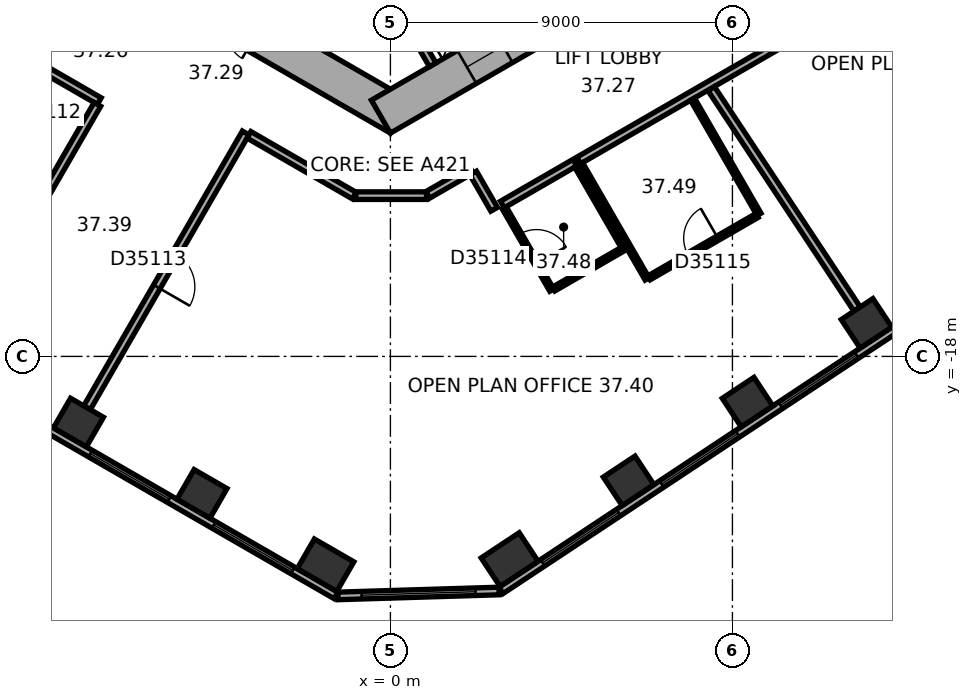
"""IFC4 building model, lengths in metres.
Left out: names, types, materials, properties, quantities, classifications, styles, units other than length and angle.
Written with IfcOpenShell. Run it as: python <this file> out.ifc"""

import sys

from ifc_helpers import new_model, si_unit, direction, frame, frame_2d, origin, origin_2d, place, context, subcontext, project, spatial, rectangle, extrude, element, fill, save


model = new_model("IFC4")
c1 = context("Model", 3, precision=1e-05, world=origin(), true_north=direction((0.0, 1.0)))
c2 = subcontext(c1, "Body", "Model", "MODEL_VIEW")
j1 = project(units=[si_unit("LENGTHUNIT", "METRE"), si_unit("PLANEANGLEUNIT", "RADIAN")], contexts=[c1])
p1 = place(None, origin())
s1 = spatial("IfcSite", under=j1, at=p1, CompositionType="ELEMENT")
p2 = place(p1, origin())
s2 = spatial("IfcBuilding", under=s1, at=p2, CompositionType="ELEMENT")
p3 = place(p2, frame((0.0, 0.0, 154.0)))
s3 = spatial("IfcBuildingStorey", under=s2, at=p3, CompositionType="ELEMENT", Elevation=154.0)
for number, where, z_axis, x_axis in (
    (1, (-8.208, -19.74, 0.0), (0.0, 0.0, 1.0), (0.866, -0.5, 0.0)),
    (2, (-4.958, -21.617, 0.0), (0.0, 0.0, 1.0), (0.866, -0.5, 0.0)),
):
    element("IfcColumn", number, at=place(p3, frame(where, z_axis=z_axis, x_axis=x_axis)), inside=s3, PredefinedType="COLUMN", context=c2, shape_type="SweptSolid", body=[
        extrude(rectangle(XDim=1.0, YDim=0.9, at=origin_2d()), origin(), (0.0, 0.0, 1.0), 3.7),
    ])
for number, where, z_axis, x_axis in (
    (3, (-1.706, -23.494, 0.0), (0.0, 0.0, 1.0), (0.866, -0.5, 0.0)),
    (4, (3.137, -23.346, 0.0), (0.0, 0.0, 1.0), (0.834, 0.552, 0.0)),
):
    element("IfcColumn", number, at=place(p3, frame(where, z_axis=z_axis, x_axis=x_axis)), inside=s3, PredefinedType="COLUMN", context=c2, shape_type="SweptSolid", body=[
        extrude(rectangle(XDim=1.2, YDim=0.9, at=origin_2d()), origin(), (0.0, 0.0, 1.0), 3.7),
    ])
for number, where, z_axis, x_axis in (
    (5, (6.268, -21.274, 0.0), (0.0, 0.0, 1.0), (0.834, 0.552, 0.0)),
    (6, (9.398, -19.202, 0.0), (0.0, 0.0, 1.0), (0.834, 0.552, 0.0)),
    (7, (12.529, -17.13, 0.0), (0.0, 0.0, 1.0), (0.834, 0.552, 0.0)),
):
    element("IfcColumn", number, at=place(p3, frame(where, z_axis=z_axis, x_axis=x_axis)), inside=s3, PredefinedType="COLUMN", context=c2, shape_type="SweptSolid", body=[
        extrude(rectangle(XDim=1.0, YDim=0.9, at=origin_2d()), origin(), (0.0, 0.0, 1.0), 3.7),
    ])
p4 = place(p3, frame((-10.25, -5.629, 0.0), z_axis=(0.0, 0.0, 1.0), x_axis=(0.866022616891, -0.50000482701, 0.0)))
e8 = element("IfcWall", 8, at=p4, inside=s3, PredefinedType="SHEAR", context=c2, shape_type="SweptSolid", body=[
    extrude(rectangle(XDim=12.125, YDim=1.0, at=frame_2d((6.062, 0.0))), origin(), (0.0, 0.0, 1.0), 3.7),
])
p5 = place(p4, frame((6.262, 0.0, 0.0)))
e9 = element("IfcOpeningElement", 9, at=p5, cuts=e8, PredefinedType="OPENING", context=c2, shape_type="SweptSolid", body=[
    extrude(rectangle(XDim=1.5, YDim=2.1, at=frame_2d((0.75, 1.05))), frame((0.0, 0.51, 0.0), z_axis=(0.0, -1.0, 0.0), x_axis=(1.0, 0.0, 0.0)), (0.0, 0.0, 1.0), 1.02),
])
p6 = place(p4, frame((1.712, 0.0, 0.0)))
e10 = element("IfcOpeningElement", 10, at=p6, cuts=e8, PredefinedType="OPENING", context=c2, shape_type="SweptSolid", body=[
    extrude(rectangle(XDim=1.1, YDim=2.1, at=frame_2d((0.55, 1.05))), frame((0.0, 0.51, 0.0), z_axis=(0.0, -1.0, 0.0), x_axis=(1.0, 0.0, 0.0)), (0.0, 0.0, 1.0), 1.02),
])
p7 = place(p4, frame((4.312, 0.0, 0.0)))
e11 = element("IfcOpeningElement", 11, at=p7, cuts=e8, PredefinedType="OPENING", context=c2, shape_type="SweptSolid", body=[
    extrude(rectangle(XDim=1.1, YDim=2.1, at=frame_2d((0.55, 1.05))), frame((0.0, 0.51, 0.0), z_axis=(0.0, -1.0, 0.0), x_axis=(1.0, 0.0, 0.0)), (0.0, 0.0, 1.0), 1.02),
])
p8 = place(p3, frame((-0.25, -11.691, 0.0), z_axis=(0.0, 0.0, 1.0), x_axis=(0.866022616891, 0.50000482701, 0.0)))
e12 = element("IfcWall", 12, at=p8, inside=s3, PredefinedType="SHEAR", context=c2, shape_type="SweptSolid", body=[
    extrude(rectangle(XDim=12.125, YDim=1.0, at=frame_2d((6.062, 0.0))), origin(), (0.0, 0.0, 1.0), 3.7),
])
p9 = place(p8, frame((2.612, 0.0, 0.0)))
e13 = element("IfcOpeningElement", 13, at=p9, cuts=e12, PredefinedType="OPENING", context=c2, shape_type="SweptSolid", body=[
    extrude(rectangle(XDim=1.1, YDim=2.1, at=frame_2d((0.55, 1.05))), frame((0.0, 0.51, 0.0), z_axis=(0.0, -1.0, 0.0), x_axis=(1.0, 0.0, 0.0)), (0.0, 0.0, 1.0), 1.02),
])
p10 = place(p8, frame((5.212, 0.0, 0.0)))
e14 = element("IfcOpeningElement", 14, at=p10, cuts=e12, PredefinedType="OPENING", context=c2, shape_type="SweptSolid", body=[
    extrude(rectangle(XDim=1.1, YDim=2.1, at=frame_2d((0.55, 1.05))), frame((0.0, 0.51, 0.0), z_axis=(0.0, -1.0, 0.0), x_axis=(1.0, 0.0, 0.0)), (0.0, 0.0, 1.0), 1.02),
])
p11 = place(p8, frame((7.812, 0.0, 0.0)))
e15 = element("IfcOpeningElement", 15, at=p11, cuts=e12, PredefinedType="OPENING", context=c2, shape_type="SweptSolid", body=[
    extrude(rectangle(XDim=1.1, YDim=2.1, at=frame_2d((0.55, 1.05))), frame((0.0, 0.51, 0.0), z_axis=(0.0, -1.0, 0.0), x_axis=(1.0, 0.0, 0.0)), (0.0, 0.0, 1.0), 1.02),
])
p12 = place(p3, frame((-18.789, -14.267, 0.0), z_axis=(0.0, 0.0, 1.0), x_axis=(0.866023315909, -0.500003616288, 0.0)))
e16 = element("IfcWall", 16, at=p12, inside=s3, PredefinedType="STANDARD", context=c2, shape_type="SweptSolid", body=[
    extrude(rectangle(XDim=20.044, YDim=0.2, at=frame_2d((10.022, 0.0))), origin(), (0.0, 0.0, 1.0), 3.7),
])
p13 = place(p12, frame((1.314, 0.0, 0.9)))
e17 = element("IfcOpeningElement", 17, at=p13, cuts=e16, PredefinedType="OPENING", context=c2, shape_type="SweptSolid", body=[
    extrude(rectangle(XDim=2.4, YDim=2.0, at=frame_2d((1.2, 1.0))), frame((0.0, 0.11, 0.0), z_axis=(0.0, -1.0, 0.0), x_axis=(1.0, 0.0, 0.0)), (0.0, 0.0, 1.0), 0.22),
])
p14 = place(p12, frame((5.069, 0.0, 0.9)))
e18 = element("IfcOpeningElement", 18, at=p14, cuts=e16, PredefinedType="OPENING", context=c2, shape_type="SweptSolid", body=[
    extrude(rectangle(XDim=2.4, YDim=2.0, at=frame_2d((1.2, 1.0))), frame((0.0, 0.11, 0.0), z_axis=(0.0, -1.0, 0.0), x_axis=(1.0, 0.0, 0.0)), (0.0, 0.0, 1.0), 0.22),
])
p15 = place(p12, frame((8.823, 0.0, 0.9)))
e19 = element("IfcOpeningElement", 19, at=p15, cuts=e16, PredefinedType="OPENING", context=c2, shape_type="SweptSolid", body=[
    extrude(rectangle(XDim=2.4, YDim=2.0, at=frame_2d((1.2, 1.0))), frame((0.0, 0.11, 0.0), z_axis=(0.0, -1.0, 0.0), x_axis=(1.0, 0.0, 0.0)), (0.0, 0.0, 1.0), 0.22),
])
p16 = place(p12, frame((12.577, 0.0, 0.9)))
e20 = element("IfcOpeningElement", 20, at=p16, cuts=e16, PredefinedType="OPENING", context=c2, shape_type="SweptSolid", body=[
    extrude(rectangle(XDim=2.4, YDim=2.0, at=frame_2d((1.2, 1.0))), frame((0.0, 0.11, 0.0), z_axis=(0.0, -1.0, 0.0), x_axis=(1.0, 0.0, 0.0)), (0.0, 0.0, 1.0), 0.22),
])
p17 = place(p12, frame((16.331, 0.0, 0.9)))
e21 = element("IfcOpeningElement", 21, at=p17, cuts=e16, PredefinedType="OPENING", context=c2, shape_type="SweptSolid", body=[
    extrude(rectangle(XDim=2.4, YDim=2.0, at=frame_2d((1.2, 1.0))), frame((0.0, 0.11, 0.0), z_axis=(0.0, -1.0, 0.0), x_axis=(1.0, 0.0, 0.0)), (0.0, 0.0, 1.0), 0.22),
])
p18 = place(p3, frame((-1.378, -24.302, 0.0), z_axis=(0.0, 0.0, 1.0), x_axis=(0.999533857267, 0.030529791629, 0.0)))
e22 = element("IfcWall", 22, at=p18, inside=s3, PredefinedType="STANDARD", context=c2, shape_type="SweptSolid", body=[
    extrude(rectangle(XDim=4.238, YDim=0.2, at=frame_2d((2.119, 0.0))), origin(), (0.0, 0.0, 1.0), 3.7),
])
p19 = place(p18, frame((0.619, 0.0, 0.9)))
e23 = element("IfcOpeningElement", 23, at=p19, cuts=e22, PredefinedType="OPENING", context=c2, shape_type="SweptSolid", body=[
    extrude(rectangle(XDim=3.0, YDim=2.0, at=frame_2d((1.5, 1.0))), frame((0.0, 0.11, 0.0), z_axis=(0.0, -1.0, 0.0), x_axis=(1.0, 0.0, 0.0)), (0.0, 0.0, 1.0), 0.22),
])
p20 = place(p3, frame((2.911, -24.156, 0.0), z_axis=(0.0, 0.0, 1.0), x_axis=(0.833882163564, 0.551942512668, 0.0)))
e24 = element("IfcWall", 24, at=p20, inside=s3, PredefinedType="STANDARD", context=c2, shape_type="SweptSolid", body=[
    extrude(rectangle(XDim=20.044, YDim=0.2, at=frame_2d((10.022, 0.0))), origin(), (0.0, 0.0, 1.0), 3.7),
])
p21 = place(p20, frame((1.313, 0.0, 0.9)))
e25 = element("IfcOpeningElement", 25, at=p21, cuts=e24, PredefinedType="OPENING", context=c2, shape_type="SweptSolid", body=[
    extrude(rectangle(XDim=2.4, YDim=2.0, at=frame_2d((1.2, 1.0))), frame((0.0, 0.11, 0.0), z_axis=(0.0, -1.0, 0.0), x_axis=(1.0, 0.0, 0.0)), (0.0, 0.0, 1.0), 0.22),
])
p22 = place(p20, frame((5.067, 0.0, 0.9)))
e26 = element("IfcOpeningElement", 26, at=p22, cuts=e24, PredefinedType="OPENING", context=c2, shape_type="SweptSolid", body=[
    extrude(rectangle(XDim=2.4, YDim=2.0, at=frame_2d((1.2, 1.0))), frame((0.0, 0.11, 0.0), z_axis=(0.0, -1.0, 0.0), x_axis=(1.0, 0.0, 0.0)), (0.0, 0.0, 1.0), 0.22),
])
p23 = place(p20, frame((8.821, 0.0, 0.9)))
e27 = element("IfcOpeningElement", 27, at=p23, cuts=e24, PredefinedType="OPENING", context=c2, shape_type="SweptSolid", body=[
    extrude(rectangle(XDim=2.4, YDim=2.0, at=frame_2d((1.2, 1.0))), frame((0.0, 0.11, 0.0), z_axis=(0.0, -1.0, 0.0), x_axis=(1.0, 0.0, 0.0)), (0.0, 0.0, 1.0), 0.22),
])
p24 = place(p20, frame((12.575, 0.0, 0.9)))
e28 = element("IfcOpeningElement", 28, at=p24, cuts=e24, PredefinedType="OPENING", context=c2, shape_type="SweptSolid", body=[
    extrude(rectangle(XDim=2.4, YDim=2.0, at=frame_2d((1.2, 1.0))), frame((0.0, 0.11, 0.0), z_axis=(0.0, -1.0, 0.0), x_axis=(1.0, 0.0, 0.0)), (0.0, 0.0, 1.0), 0.22),
])
p25 = place(p20, frame((16.329, 0.0, 0.9)))
e29 = element("IfcOpeningElement", 29, at=p25, cuts=e24, PredefinedType="OPENING", context=c2, shape_type="SweptSolid", body=[
    extrude(rectangle(XDim=2.4, YDim=2.0, at=frame_2d((1.2, 1.0))), frame((0.0, 0.11, 0.0), z_axis=(0.0, -1.0, 0.0), x_axis=(1.0, 0.0, 0.0)), (0.0, 0.0, 1.0), 0.22),
])
p26 = place(p3, frame((0.013, -8.422, 0.0), z_axis=(0.0, 0.0, 1.0), x_axis=(0.500077893725, -0.86598042715, 0.0)))
e30 = element("IfcWall", 30, at=p26, inside=s3, PredefinedType="PARTITIONING", context=c2, shape_type="SweptSolid", body=[
    extrude(rectangle(XDim=2.2, YDim=0.2, at=frame_2d((1.1, 0.0))), origin(), (0.0, 0.0, 1.0), 3.42),
])
p27 = place(p3, frame((-11.435, -9.103, 0.0), z_axis=(0.0, 0.0, 1.0), x_axis=(0.866007399799, -0.500031182522, 0.0)))
e31 = element("IfcWall", 31, at=p27, inside=s3, PredefinedType="PARTITIONING", context=c2, shape_type="SweptSolid", body=[
    extrude(rectangle(XDim=4.358, YDim=0.2, at=frame_2d((2.179, 0.0))), origin(), (0.0, 0.0, 1.0), 3.42),
])
p28 = place(p3, frame((-11.235, -17.474, 0.0), z_axis=(0.0, 0.0, 1.0), x_axis=(0.500009260695, 0.866020057054, 0.0)))
e32 = element("IfcWall", 32, at=p28, inside=s3, PredefinedType="PARTITIONING", context=c2, shape_type="SweptSolid", body=[
    extrude(rectangle(XDim=7.049, YDim=0.2, at=frame_2d((3.524, 0.0))), origin(), (0.0, 0.0, 1.0), 2.87),
])
p29 = place(p28, frame((3.024, 0.0, 0.0)))
e33 = element("IfcOpeningElement", 33, at=p29, cuts=e32, PredefinedType="OPENING", context=c2, shape_type="SweptSolid", body=[
    extrude(rectangle(XDim=1.0, YDim=2.1, at=frame_2d((0.5, 1.05))), frame((0.0, 0.11, 0.0), z_axis=(0.0, -1.0, 0.0), x_axis=(1.0, 0.0, 0.0)), (0.0, 0.0, 1.0), 0.22),
])
p30 = place(p3, frame((-7.984, -19.351, 0.0), z_axis=(0.0, 0.0, 1.0), x_axis=(0.500010139422, 0.866019549707, 0.0)))
e34 = element("IfcWall", 34, at=p30, inside=s3, PredefinedType="PARTITIONING", context=c2, shape_type="SweptSolid", body=[
    extrude(rectangle(XDim=8.35, YDim=0.2, at=frame_2d((4.175, 0.0))), origin(), (0.0, 0.0, 1.0), 3.42),
])
p31 = place(p30, frame((3.675, 0.0, 0.0)))
e35 = element("IfcOpeningElement", 35, at=p31, cuts=e34, PredefinedType="OPENING", context=c2, shape_type="SweptSolid", body=[
    extrude(rectangle(XDim=1.0, YDim=2.1, at=frame_2d((0.5, 1.05))), frame((0.0, 0.11, 0.0), z_axis=(0.0, -1.0, 0.0), x_axis=(1.0, 0.0, 0.0)), (0.0, 0.0, 1.0), 0.22),
])
p32 = place(p3, frame((-3.722, -12.169, 0.0), z_axis=(0.0, 0.0, 1.0), x_axis=(0.866033163891, -0.499986558861, 0.0)))
e36 = element("IfcWall", 36, at=p32, inside=s3, PredefinedType="PARTITIONING", context=c2, shape_type="SweptSolid", body=[
    extrude(rectangle(XDim=3.201, YDim=0.2, at=frame_2d((1.6, 0.0))), origin(), (0.0, 0.0, 1.0), 3.42),
])
p33 = place(p3, frame((-0.91, -13.77, 0.0), z_axis=(0.0, 0.0, 1.0), x_axis=(1.0, 0.0, 0.0)))
e37 = element("IfcWall", 37, at=p33, inside=s3, PredefinedType="PARTITIONING", context=c2, shape_type="SweptSolid", body=[
    extrude(rectangle(XDim=1.86, YDim=0.2, at=frame_2d((0.93, 0.0))), origin(), (0.0, 0.0, 1.0), 3.42),
])
p34 = place(p3, frame((0.985, -13.75, 0.0), z_axis=(0.0, 0.0, 1.0), x_axis=(0.866028661061, 0.499994358189, 0.0)))
e38 = element("IfcWall", 38, at=p34, inside=s3, PredefinedType="PARTITIONING", context=c2, shape_type="SweptSolid", body=[
    extrude(rectangle(XDim=1.321, YDim=0.2, at=frame_2d((0.661, 0.0))), origin(), (0.0, 0.0, 1.0), 3.42),
])
p35 = place(p3, frame((2.179, -13.176, 0.0), z_axis=(0.0, 0.0, 1.0), x_axis=(0.499978356969, -0.866037899034, 0.0)))
e39 = element("IfcWall", 39, at=p35, inside=s3, PredefinedType="PARTITIONING", context=c2, shape_type="SweptSolid", body=[
    extrude(rectangle(XDim=1.101, YDim=0.2, at=frame_2d((0.551, 0.0))), origin(), (0.0, 0.0, 1.0), 3.42),
])
p36 = place(p3, frame((2.946, -14.004, 0.0), z_axis=(0.0, 0.0, 1.0), x_axis=(0.866008176907, 0.50002983664, 0.0)))
e40 = element("IfcWall", 40, at=p36, inside=s3, PredefinedType="PARTITIONING", context=c2, shape_type="SweptSolid", body=[
    extrude(rectangle(XDim=2.2, YDim=0.2, at=frame_2d((1.1, 0.0))), origin(), (0.0, 0.0, 1.0), 3.42),
])
p37 = place(p3, frame((4.246, -16.256, 0.0), z_axis=(0.0, 0.0, 1.0), x_axis=(-0.499961950354, 0.866047370643, 0.0)))
e41 = element("IfcWall", 41, at=p37, inside=s3, PredefinedType="PARTITIONING", context=c2, shape_type="SweptSolid", body=[
    extrude(rectangle(XDim=2.5, YDim=0.12, at=frame_2d((1.25, 0.0))), origin(), (0.0, 0.0, 1.0), 3.42),
])
p38 = place(p37, frame((0.8, 0.0, 0.0)))
e42 = element("IfcOpeningElement", 42, at=p38, cuts=e41, PredefinedType="OPENING", context=c2, shape_type="SweptSolid", body=[
    extrude(rectangle(XDim=0.9, YDim=2.1, at=frame_2d((0.45, 1.05))), frame((0.0, 0.07, 0.0), z_axis=(0.0, -1.0, 0.0), x_axis=(1.0, 0.0, 0.0)), (0.0, 0.0, 1.0), 0.14),
])
p39 = place(p3, frame((4.901, -12.991, 0.0), z_axis=(0.0, 0.0, 1.0), x_axis=(0.500004234368, -0.866022959057, 0.0)))
e43 = element("IfcWall", 43, at=p39, inside=s3, PredefinedType="PARTITIONING", context=c2, shape_type="SweptSolid", body=[
    extrude(rectangle(XDim=2.5, YDim=0.12, at=frame_2d((1.25, 0.0))), origin(), (0.0, 0.0, 1.0), 3.42),
])
p40 = place(p3, frame((4.955, -12.844, 0.0), z_axis=(0.0, 0.0, 1.0), x_axis=(0.86602379309, 0.500002789795, 0.0)))
e44 = element("IfcWall", 44, at=p40, inside=s3, PredefinedType="PARTITIONING", context=c2, shape_type="SweptSolid", body=[
    extrude(rectangle(XDim=6.232, YDim=0.2, at=frame_2d((3.116, 0.0))), origin(), (0.0, 0.0, 1.0), 3.42),
])
p41 = place(p3, frame((6.099, -15.186, 0.0), z_axis=(0.0, 0.0, 1.0), x_axis=(-0.866009661879, -0.500027264788, 0.0)))
e45 = element("IfcWall", 45, at=p41, inside=s3, PredefinedType="PARTITIONING", context=c2, shape_type="SweptSolid", body=[
    extrude(rectangle(XDim=2.08, YDim=0.12, at=frame_2d((1.04, 0.0))), origin(), (0.0, 0.0, 1.0), 3.42),
])
for number, where, z_axis, x_axis in (
    (46, (6.755, -15.962, 0.0), (0.0, 0.0, 1.0), (-0.5, 0.866, 0.0)),
    (47, (7.949, -11.231, 0.0), (0.0, 0.0, 1.0), (0.5, -0.866, 0.0)),
):
    element("IfcWall", number, at=place(p3, frame(where, z_axis=z_axis, x_axis=x_axis)), inside=s3, PredefinedType="PARTITIONING", context=c2, shape_type="SweptSolid", body=[
        extrude(rectangle(XDim=3.5, YDim=0.12, at=frame_2d((1.75, 0.0))), origin(), (0.0, 0.0, 1.0), 3.42),
    ])
p42 = place(p3, frame((9.647, -14.292, 0.0), z_axis=(0.0, 0.0, 1.0), x_axis=(-0.866040564224, -0.499973740429, 0.0)))
e48 = element("IfcWall", 48, at=p42, inside=s3, PredefinedType="PARTITIONING", context=c2, shape_type="SweptSolid", body=[
    extrude(rectangle(XDim=3.28, YDim=0.12, at=frame_2d((1.64, 0.0))), origin(), (0.0, 0.0, 1.0), 3.42),
])
p43 = place(p42, frame((1.19, 0.0, 0.0)))
e49 = element("IfcOpeningElement", 49, at=p43, cuts=e48, PredefinedType="OPENING", context=c2, shape_type="SweptSolid", body=[
    extrude(rectangle(XDim=0.9, YDim=2.1, at=frame_2d((0.45, 1.05))), frame((0.0, 0.07, 0.0), z_axis=(0.0, -1.0, 0.0), x_axis=(1.0, 0.0, 0.0)), (0.0, 0.0, 1.0), 0.14),
])
p44 = place(p3, frame((12.281, -16.755, 0.0), z_axis=(0.0, 0.0, 1.0), x_axis=(-0.551925794663, 0.833893228888, 0.0)))
e50 = element("IfcWall", 50, at=p44, inside=s3, PredefinedType="PARTITIONING", context=c2, shape_type="SweptSolid", body=[
    extrude(rectangle(XDim=6.953, YDim=0.2, at=frame_2d((3.476, 0.0))), origin(), (0.0, 0.0, 1.0), 3.42),
])
p45 = place(p16, origin())
e51 = element("IfcWindow", 51, at=p45, inside=s3, PartitioningType="SINGLE_PANEL", PredefinedType="WINDOW", context=c2, shape_type="SweptSolid", body=[
    extrude(rectangle(XDim=2.4, YDim=2.0, at=frame_2d((1.2, 1.0))), frame((0.0, 0.03, 0.0), z_axis=(0.0, -1.0, 0.0), x_axis=(1.0, 0.0, 0.0)), (0.0, 0.0, 1.0), 0.06),
])
fill(e20, e51)
p46 = place(p17, origin())
e52 = element("IfcWindow", 52, at=p46, inside=s3, PartitioningType="SINGLE_PANEL", PredefinedType="WINDOW", context=c2, shape_type="SweptSolid", body=[
    extrude(rectangle(XDim=2.4, YDim=2.0, at=frame_2d((1.2, 1.0))), frame((0.0, 0.03, 0.0), z_axis=(0.0, -1.0, 0.0), x_axis=(1.0, 0.0, 0.0)), (0.0, 0.0, 1.0), 0.06),
])
fill(e21, e52)
p47 = place(p19, origin())
e53 = element("IfcWindow", 53, at=p47, inside=s3, PartitioningType="SINGLE_PANEL", PredefinedType="WINDOW", context=c2, shape_type="SweptSolid", body=[
    extrude(rectangle(XDim=3.0, YDim=2.0, at=frame_2d((1.5, 1.0))), frame((0.0, 0.03, 0.0), z_axis=(0.0, -1.0, 0.0), x_axis=(1.0, 0.0, 0.0)), (0.0, 0.0, 1.0), 0.06),
])
fill(e23, e53)
p48 = place(p21, origin())
e54 = element("IfcWindow", 54, at=p48, inside=s3, PartitioningType="SINGLE_PANEL", PredefinedType="WINDOW", context=c2, shape_type="SweptSolid", body=[
    extrude(rectangle(XDim=2.4, YDim=2.0, at=frame_2d((1.2, 1.0))), frame((0.0, 0.03, 0.0), z_axis=(0.0, -1.0, 0.0), x_axis=(1.0, 0.0, 0.0)), (0.0, 0.0, 1.0), 0.06),
])
fill(e25, e54)
p49 = place(p22, origin())
e55 = element("IfcWindow", 55, at=p49, inside=s3, PartitioningType="SINGLE_PANEL", PredefinedType="WINDOW", context=c2, shape_type="SweptSolid", body=[
    extrude(rectangle(XDim=2.4, YDim=2.0, at=frame_2d((1.2, 1.0))), frame((0.0, 0.03, 0.0), z_axis=(0.0, -1.0, 0.0), x_axis=(1.0, 0.0, 0.0)), (0.0, 0.0, 1.0), 0.06),
])
fill(e26, e55)
p50 = place(p23, origin())
e56 = element("IfcWindow", 56, at=p50, inside=s3, PartitioningType="SINGLE_PANEL", PredefinedType="WINDOW", context=c2, shape_type="SweptSolid", body=[
    extrude(rectangle(XDim=2.4, YDim=2.0, at=frame_2d((1.2, 1.0))), frame((0.0, 0.03, 0.0), z_axis=(0.0, -1.0, 0.0), x_axis=(1.0, 0.0, 0.0)), (0.0, 0.0, 1.0), 0.06),
])
fill(e27, e56)
p51 = place(p9, origin())
e57 = element("IfcDoor", 57, at=p51, inside=s3, OperationType="DOUBLE_DOOR_SLIDING", PredefinedType="DOOR", context=c2, shape_type="SweptSolid", body=[
    extrude(rectangle(XDim=1.1, YDim=2.1, at=frame_2d((0.55, 1.05))), frame((0.0, 0.025, 0.0), z_axis=(0.0, -1.0, 0.0), x_axis=(1.0, 0.0, 0.0)), (0.0, 0.0, 1.0), 0.05),
])
fill(e13, e57)
p52 = place(p31, origin())
e58 = element("IfcDoor", 58, at=p52, inside=s3, OperationType="SINGLE_SWING_LEFT", PredefinedType="DOOR", context=c2, shape_type="SweptSolid", body=[
    extrude(rectangle(XDim=1.0, YDim=2.1, at=frame_2d((0.5, 1.05))), frame((0.0, 0.025, 0.0), z_axis=(0.0, -1.0, 0.0), x_axis=(1.0, 0.0, 0.0)), (0.0, 0.0, 1.0), 0.05),
])
fill(e35, e58)
p53 = place(p38, origin())
e59 = element("IfcDoor", 59, at=p53, inside=s3, OperationType="SINGLE_SWING_LEFT", PredefinedType="DOOR", context=c2, shape_type="SweptSolid", body=[
    extrude(rectangle(XDim=0.9, YDim=2.1, at=frame_2d((0.45, 1.05))), frame((0.0, 0.025, 0.0), z_axis=(0.0, -1.0, 0.0), x_axis=(1.0, 0.0, 0.0)), (0.0, 0.0, 1.0), 0.05),
])
fill(e42, e59)
p54 = place(p43, origin())
e60 = element("IfcDoor", 60, at=p54, inside=s3, OperationType="SINGLE_SWING_LEFT", PredefinedType="DOOR", context=c2, shape_type="SweptSolid", body=[
    extrude(rectangle(XDim=0.9, YDim=2.1, at=frame_2d((0.45, 1.05))), frame((0.0, 0.025, 0.0), z_axis=(0.0, -1.0, 0.0), x_axis=(1.0, 0.0, 0.0)), (0.0, 0.0, 1.0), 0.05),
])
fill(e49, e60)
save(model, sys.argv[1])
